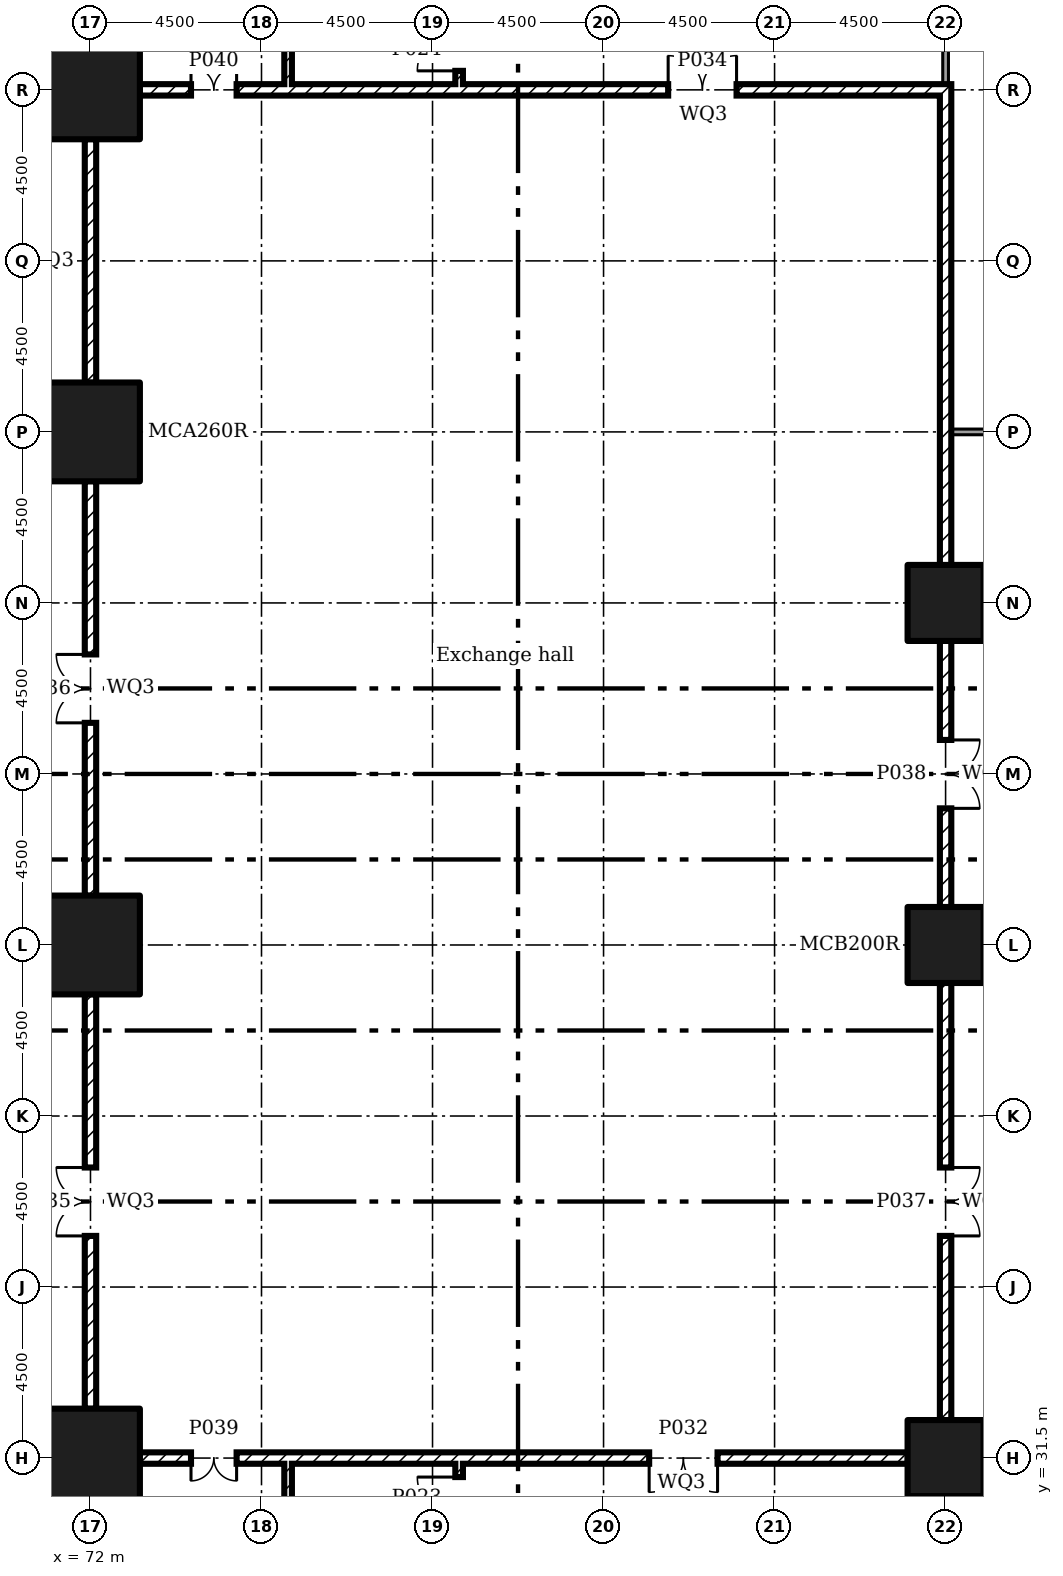
"""IFC4 building model, lengths in metres.
Left out: names, types, materials, properties, quantities, classifications, styles, units other than length and angle.
Written with IfcOpenShell. Run it as: python <this file> out.ifc"""

import sys

from ifc_helpers import new_model, si_unit, direction, frame, frame_2d, origin, origin_2d, place, context, subcontext, project, spatial, rectangle, extrude, element, fill, save


model = new_model("IFC4")
c1 = context("Model", 3, precision=1e-05, world=origin(), true_north=direction((0.0, 1.0)))
c2 = subcontext(c1, "Body", "Model", "MODEL_VIEW")
j1 = project(units=[si_unit("LENGTHUNIT", "METRE"), si_unit("PLANEANGLEUNIT", "RADIAN")], contexts=[c1])
p1 = place(None, origin())
s1 = spatial("IfcSite", under=j1, at=p1, CompositionType="ELEMENT")
p2 = place(p1, origin())
s2 = spatial("IfcBuilding", under=s1, at=p2, CompositionType="ELEMENT")
p3 = place(p2, frame((0.0, 0.0, 6.0)))
s3 = spatial("IfcBuildingStorey", under=s2, at=p3, CompositionType="ELEMENT", Elevation=6.0)
for number, where in (
    (1, (72.0, 31.5, 0.0)),
    (2, (72.0, 45.0, 0.0)),
    (3, (72.0, 58.5, 0.0)),
    (4, (72.0, 67.5, 0.0)),
):
    element("IfcColumn", number, at=place(p3, frame(where)), inside=s3, PredefinedType="COLUMN", context=c2, shape_type="SweptSolid", body=[
        extrude(rectangle(XDim=2.6, YDim=2.6, at=origin_2d()), origin(), (0.0, 0.0, 1.0), 5.5),
    ])
for number, where in (
    (5, (94.5, 31.5, 0.0)),
    (6, (94.5, 45.0, 0.0)),
    (7, (94.5, 54.0, 0.0)),
):
    element("IfcColumn", number, at=place(p3, frame(where)), inside=s3, PredefinedType="COLUMN", context=c2, shape_type="SweptSolid", body=[
        extrude(rectangle(XDim=2.0, YDim=2.0, at=origin_2d()), origin(), (0.0, 0.0, 1.0), 5.5),
    ])
p4 = place(p3, frame((81.6, 31.5, 0.0)))
e8 = element("IfcWall", 8, at=p4, inside=s3, PredefinedType="SOLIDWALL", context=c2, shape_type="SweptSolid", body=[
    extrude(rectangle(XDim=11.905, YDim=0.3, at=frame_2d((5.952, 0.0))), origin(), (0.0, 0.0, 1.0), 5.5),
])
p5 = place(p4, frame((5.1, 0.0, 0.0)))
e9 = element("IfcOpeningElement", 9, at=p5, cuts=e8, PredefinedType="OPENING", context=c2, shape_type="SweptSolid", body=[
    extrude(rectangle(XDim=1.8, YDim=2.1, at=frame_2d((0.9, 1.05))), frame((0.0, 0.16, 0.0), z_axis=(0.0, -1.0, 0.0), x_axis=(1.0, 0.0, 0.0)), (0.0, 0.0, 1.0), 0.32),
])
p6 = place(p3, frame((94.5, 26.925, 0.0), z_axis=(0.0, 0.0, 1.0), x_axis=(0.0, 1.0, 0.0)))
e10 = element("IfcWall", 10, at=p6, inside=s3, PredefinedType="PARTITIONING", context=c2, shape_type="SweptSolid", body=[
    extrude(rectangle(XDim=3.58, YDim=0.15, at=frame_2d((1.79, 0.0))), origin(), (0.0, 0.0, 1.0), 5.05),
])
p7 = place(p6, frame((1.225, 0.0, 0.0)))
e11 = element("IfcOpeningElement", 11, at=p7, cuts=e10, PredefinedType="OPENING", context=c2, shape_type="SweptSolid", body=[
    extrude(rectangle(XDim=1.2, YDim=2.1, at=frame_2d((0.6, 1.05))), frame((0.0, 0.085, 0.0), z_axis=(0.0, -1.0, 0.0), x_axis=(1.0, 0.0, 0.0)), (0.0, 0.0, 1.0), 0.17),
])
p8 = place(p3, frame((81.7, 22.425, 0.0), z_axis=(0.0, 0.0, 1.0), x_axis=(0.0, 1.0, 0.0)))
e12 = element("IfcWall", 12, at=p8, inside=s3, PredefinedType="SOLIDWALL", context=c2, shape_type="SweptSolid", body=[
    extrude(rectangle(XDim=8.925, YDim=0.2, at=frame_2d((4.462, 0.0))), origin(), (0.0, 0.0, 1.0), 5.05),
])
p9 = place(p8, frame((7.475, 0.0, 0.0)))
e13 = element("IfcOpeningElement", 13, at=p9, cuts=e12, PredefinedType="OPENING", context=c2, shape_type="SweptSolid", body=[
    extrude(rectangle(XDim=1.1, YDim=2.1, at=frame_2d((0.55, 1.05))), frame((0.0, 0.11, 0.0), z_axis=(0.0, -1.0, 0.0), x_axis=(1.0, 0.0, 0.0)), (0.0, 0.0, 1.0), 0.22),
])
p10 = place(p3, frame((81.6, 67.5, 0.0)))
e14 = element("IfcWall", 14, at=p10, inside=s3, PredefinedType="SOLIDWALL", context=c2, shape_type="SweptSolid", body=[
    extrude(rectangle(XDim=13.05, YDim=0.3, at=frame_2d((6.525, 0.0))), origin(), (0.0, 0.0, 1.0), 5.5),
])
p11 = place(p10, frame((5.6, 0.0, 0.0)))
e15 = element("IfcOpeningElement", 15, at=p11, cuts=e14, PredefinedType="OPENING", context=c2, shape_type="SweptSolid", body=[
    extrude(rectangle(XDim=1.8, YDim=2.1, at=frame_2d((0.9, 1.05))), frame((0.0, 0.16, 0.0), z_axis=(0.0, -1.0, 0.0), x_axis=(1.0, 0.0, 0.0)), (0.0, 0.0, 1.0), 0.32),
])
p12 = place(p3, frame((72.0, 32.795, 0.0), z_axis=(0.0, 0.0, 1.0), x_axis=(0.0, 1.0, 0.0)))
e16 = element("IfcWall", 16, at=p12, inside=s3, PredefinedType="SOLIDWALL", context=c2, shape_type="SweptSolid", body=[
    extrude(rectangle(XDim=10.91, YDim=0.3, at=frame_2d((5.455, 0.0))), origin(), (0.0, 0.0, 1.0), 10.05),
])
p13 = place(p12, frame((4.55, 0.0, 0.0)))
e17 = element("IfcOpeningElement", 17, at=p13, cuts=e16, PredefinedType="OPENING", context=c2, shape_type="SweptSolid", body=[
    extrude(rectangle(XDim=1.8, YDim=2.1, at=frame_2d((0.9, 1.05))), frame((0.0, 0.16, 0.0), z_axis=(0.0, -1.0, 0.0), x_axis=(1.0, 0.0, 0.0)), (0.0, 0.0, 1.0), 0.32),
])
p14 = place(p3, frame((72.0, 46.295, 0.0), z_axis=(0.0, 0.0, 1.0), x_axis=(0.0, 1.0, 0.0)))
e18 = element("IfcWall", 18, at=p14, inside=s3, PredefinedType="SOLIDWALL", context=c2, shape_type="SweptSolid", body=[
    extrude(rectangle(XDim=10.91, YDim=0.3, at=frame_2d((5.455, 0.0))), origin(), (0.0, 0.0, 1.0), 10.05),
])
p15 = place(p14, frame((4.55, 0.0, 0.0)))
e19 = element("IfcOpeningElement", 19, at=p15, cuts=e18, PredefinedType="OPENING", context=c2, shape_type="SweptSolid", body=[
    extrude(rectangle(XDim=1.8, YDim=2.1, at=frame_2d((0.9, 1.05))), frame((0.0, 0.16, 0.0), z_axis=(0.0, -1.0, 0.0), x_axis=(1.0, 0.0, 0.0)), (0.0, 0.0, 1.0), 0.32),
])
p16 = place(p3, frame((72.0, 59.795, 0.0), z_axis=(0.0, 0.0, 1.0), x_axis=(0.0, 1.0, 0.0)))
e20 = element("IfcWall", 20, at=p16, inside=s3, PredefinedType="SOLIDWALL", context=c2, shape_type="SweptSolid", body=[
    extrude(rectangle(XDim=6.41, YDim=0.3, at=frame_2d((3.205, 0.0))), origin(), (0.0, 0.0, 1.0), 10.05),
])
p17 = place(p3, frame((94.5, 32.495, 0.0), z_axis=(0.0, 0.0, 1.0), x_axis=(0.0, 1.0, 0.0)))
e21 = element("IfcWall", 21, at=p17, inside=s3, PredefinedType="SOLIDWALL", context=c2, shape_type="SweptSolid", body=[
    extrude(rectangle(XDim=11.51, YDim=0.3, at=frame_2d((5.755, 0.0))), origin(), (0.0, 0.0, 1.0), 10.05),
])
p18 = place(p17, frame((4.85, 0.0, 0.0)))
e22 = element("IfcOpeningElement", 22, at=p18, cuts=e21, PredefinedType="OPENING", context=c2, shape_type="SweptSolid", body=[
    extrude(rectangle(XDim=1.8, YDim=2.1, at=frame_2d((0.9, 1.05))), frame((0.0, 0.16, 0.0), z_axis=(0.0, -1.0, 0.0), x_axis=(1.0, 0.0, 0.0)), (0.0, 0.0, 1.0), 0.32),
])
p19 = place(p3, frame((94.5, 45.995, 0.0), z_axis=(0.0, 0.0, 1.0), x_axis=(0.0, 1.0, 0.0)))
e23 = element("IfcWall", 23, at=p19, inside=s3, PredefinedType="SOLIDWALL", context=c2, shape_type="SweptSolid", body=[
    extrude(rectangle(XDim=7.01, YDim=0.3, at=frame_2d((3.505, 0.0))), origin(), (0.0, 0.0, 1.0), 10.05),
])
p20 = place(p19, frame((2.6, 0.0, 0.0)))
e24 = element("IfcOpeningElement", 24, at=p20, cuts=e23, PredefinedType="OPENING", context=c2, shape_type="SweptSolid", body=[
    extrude(rectangle(XDim=1.8, YDim=2.1, at=frame_2d((0.9, 1.05))), frame((0.0, 0.16, 0.0), z_axis=(0.0, -1.0, 0.0), x_axis=(1.0, 0.0, 0.0)), (0.0, 0.0, 1.0), 0.32),
])
p21 = place(p3, frame((94.5, 54.995, 0.0), z_axis=(0.0, 0.0, 1.0), x_axis=(0.0, 1.0, 0.0)))
e25 = element("IfcWall", 25, at=p21, inside=s3, PredefinedType="SOLIDWALL", context=c2, shape_type="SweptSolid", body=[
    extrude(rectangle(XDim=3.58, YDim=0.3, at=frame_2d((1.79, 0.0))), origin(), (0.0, 0.0, 1.0), 10.05),
])
p22 = place(p3, frame((94.5, 58.425, 0.0), z_axis=(0.0, 0.0, 1.0), x_axis=(0.0, 1.0, 0.0)))
e26 = element("IfcWall", 26, at=p22, inside=s3, PredefinedType="SOLIDWALL", context=c2, shape_type="SweptSolid", body=[
    extrude(rectangle(XDim=8.925, YDim=0.3, at=frame_2d((4.462, 0.0))), origin(), (0.0, 0.0, 1.0), 10.05),
])
p23 = place(p3, frame((73.295, 31.5, 0.0)))
e27 = element("IfcWall", 27, at=p23, inside=s3, PredefinedType="SOLIDWALL", context=c2, shape_type="SweptSolid", body=[
    extrude(rectangle(XDim=4.005, YDim=0.3, at=frame_2d((2.002, 0.0))), origin(), (0.0, 0.0, 1.0), 5.5),
])
p24 = place(p23, frame((1.35, 0.0, 0.0)))
e28 = element("IfcOpeningElement", 28, at=p24, cuts=e27, PredefinedType="OPENING", context=c2, shape_type="SweptSolid", body=[
    extrude(rectangle(XDim=1.2, YDim=2.1, at=frame_2d((0.6, 1.05))), frame((0.0, 0.16, 0.0), z_axis=(0.0, -1.0, 0.0), x_axis=(1.0, 0.0, 0.0)), (0.0, 0.0, 1.0), 0.32),
])
p25 = place(p3, frame((77.2, 31.5, 0.0)))
e29 = element("IfcWall", 29, at=p25, inside=s3, PredefinedType="SOLIDWALL", context=c2, shape_type="SweptSolid", body=[
    extrude(rectangle(XDim=4.5, YDim=0.3, at=frame_2d((2.25, 0.0))), origin(), (0.0, 0.0, 1.0), 5.5),
])
p26 = place(p3, frame((73.295, 67.5, 0.0)))
e30 = element("IfcWall", 30, at=p26, inside=s3, PredefinedType="SOLIDWALL", context=c2, shape_type="SweptSolid", body=[
    extrude(rectangle(XDim=4.005, YDim=0.3, at=frame_2d((2.002, 0.0))), origin(), (0.0, 0.0, 1.0), 5.5),
])
p27 = place(p26, frame((1.35, 0.0, 0.0)))
e31 = element("IfcOpeningElement", 31, at=p27, cuts=e30, PredefinedType="OPENING", context=c2, shape_type="SweptSolid", body=[
    extrude(rectangle(XDim=1.2, YDim=2.1, at=frame_2d((0.6, 1.05))), frame((0.0, 0.16, 0.0), z_axis=(0.0, -1.0, 0.0), x_axis=(1.0, 0.0, 0.0)), (0.0, 0.0, 1.0), 0.32),
])
p28 = place(p3, frame((77.2, 67.5, 0.0)))
e32 = element("IfcWall", 32, at=p28, inside=s3, PredefinedType="SOLIDWALL", context=c2, shape_type="SweptSolid", body=[
    extrude(rectangle(XDim=4.5, YDim=0.3, at=frame_2d((2.25, 0.0))), origin(), (0.0, 0.0, 1.0), 5.5),
])
p29 = place(p3, frame((94.5, 67.5, 0.0), z_axis=(0.0, 0.0, 1.0), x_axis=(0.0, 1.0, 0.0)))
e33 = element("IfcWall", 33, at=p29, inside=s3, PredefinedType="PARTITIONING", context=c2, shape_type="SweptSolid", body=[
    extrude(rectangle(XDim=8.925, YDim=0.15, at=frame_2d((4.462, 0.0))), origin(), (0.0, 0.0, 1.0), 5.05),
])
p30 = place(p3, frame((81.7, 67.65, 0.0), z_axis=(0.0, 0.0, 1.0), x_axis=(0.0, 1.0, 0.0)))
e34 = element("IfcWall", 34, at=p30, inside=s3, PredefinedType="SOLIDWALL", context=c2, shape_type="SweptSolid", body=[
    extrude(rectangle(XDim=8.925, YDim=0.2, at=frame_2d((4.462, 0.0))), origin(), (0.0, 0.0, 1.0), 5.05),
])
p31 = place(p30, frame((0.35, 0.0, 0.0)))
e35 = element("IfcOpeningElement", 35, at=p31, cuts=e34, PredefinedType="OPENING", context=c2, shape_type="SweptSolid", body=[
    extrude(rectangle(XDim=1.1, YDim=2.1, at=frame_2d((0.55, 1.05))), frame((0.0, 0.11, 0.0), z_axis=(0.0, -1.0, 0.0), x_axis=(1.0, 0.0, 0.0)), (0.0, 0.0, 1.0), 0.22),
])
p32 = place(p3, frame((94.65, 58.5, 0.0)))
e36 = element("IfcWall", 36, at=p32, inside=s3, PredefinedType="PARTITIONING", context=c2, shape_type="SweptSolid", body=[
    extrude(rectangle(XDim=3.355, YDim=0.15, at=frame_2d((1.677, 0.0))), origin(), (0.0, 0.0, 1.0), 5.05),
])
for number, where, z_axis, x_axis in (
    (37, (77.2, 22.6, 0.0), (0.0, 0.0, 1.0), (0.0, 1.0, 0.0)),
    (38, (77.2, 67.65, 0.0), (0.0, 0.0, 1.0), (0.0, 1.0, 0.0)),
):
    element("IfcWall", number, at=place(p3, frame(where, z_axis=z_axis, x_axis=x_axis)), inside=s3, PredefinedType="SOLIDWALL", context=c2, shape_type="SweptSolid", body=[
        extrude(rectangle(XDim=8.75, YDim=0.2, at=frame_2d((4.375, 0.0))), origin(), (0.0, 0.0, 1.0), 5.05),
    ])
p33 = place(p9, origin())
e39 = element("IfcDoor", 39, at=p33, inside=s3, OperationType="SINGLE_SWING_LEFT", PredefinedType="DOOR", context=c2, shape_type="SweptSolid", body=[
    extrude(rectangle(XDim=1.1, YDim=2.1, at=frame_2d((0.55, 1.05))), frame((0.0, 0.025, 0.0), z_axis=(0.0, -1.0, 0.0), x_axis=(1.0, 0.0, 0.0)), (0.0, 0.0, 1.0), 0.05),
])
fill(e13, e39)
p34 = place(p31, origin())
e40 = element("IfcDoor", 40, at=p34, inside=s3, OperationType="SINGLE_SWING_RIGHT", PredefinedType="DOOR", context=c2, shape_type="SweptSolid", body=[
    extrude(rectangle(XDim=1.1, YDim=2.1, at=frame_2d((0.55, 1.05))), frame((0.0, 0.025, 0.0), z_axis=(0.0, -1.0, 0.0), x_axis=(1.0, 0.0, 0.0)), (0.0, 0.0, 1.0), 0.05),
])
fill(e35, e40)
p35 = place(p5, frame((1.8, 0.0, 0.0), x_axis=(-1.0, 0.0, 0.0)))
e41 = element("IfcDoor", 41, at=p35, inside=s3, OperationType="DOUBLE_DOOR_SINGLE_SWING", PredefinedType="DOOR", context=c2, shape_type="SweptSolid", body=[
    extrude(rectangle(XDim=1.8, YDim=2.1, at=frame_2d((0.9, 1.05))), frame((0.0, 0.025, 0.0), z_axis=(0.0, -1.0, 0.0), x_axis=(1.0, 0.0, 0.0)), (0.0, 0.0, 1.0), 0.05),
])
fill(e9, e41)
p36 = place(p11, origin())
e42 = element("IfcDoor", 42, at=p36, inside=s3, OperationType="DOUBLE_DOOR_SINGLE_SWING", PredefinedType="DOOR", context=c2, shape_type="SweptSolid", body=[
    extrude(rectangle(XDim=1.8, YDim=2.1, at=frame_2d((0.9, 1.05))), frame((0.0, 0.025, 0.0), z_axis=(0.0, -1.0, 0.0), x_axis=(1.0, 0.0, 0.0)), (0.0, 0.0, 1.0), 0.05),
])
fill(e15, e42)
p37 = place(p13, origin())
e43 = element("IfcDoor", 43, at=p37, inside=s3, OperationType="DOUBLE_DOOR_SINGLE_SWING", PredefinedType="DOOR", context=c2, shape_type="SweptSolid", body=[
    extrude(rectangle(XDim=1.8, YDim=2.1, at=frame_2d((0.9, 1.05))), frame((0.0, 0.025, 0.0), z_axis=(0.0, -1.0, 0.0), x_axis=(1.0, 0.0, 0.0)), (0.0, 0.0, 1.0), 0.05),
])
fill(e17, e43)
p38 = place(p15, origin())
e44 = element("IfcDoor", 44, at=p38, inside=s3, OperationType="DOUBLE_DOOR_SINGLE_SWING", PredefinedType="DOOR", context=c2, shape_type="SweptSolid", body=[
    extrude(rectangle(XDim=1.8, YDim=2.1, at=frame_2d((0.9, 1.05))), frame((0.0, 0.025, 0.0), z_axis=(0.0, -1.0, 0.0), x_axis=(1.0, 0.0, 0.0)), (0.0, 0.0, 1.0), 0.05),
])
fill(e19, e44)
p39 = place(p18, frame((1.8, 0.0, 0.0), x_axis=(-1.0, 0.0, 0.0)))
e45 = element("IfcDoor", 45, at=p39, inside=s3, OperationType="DOUBLE_DOOR_SINGLE_SWING", PredefinedType="DOOR", context=c2, shape_type="SweptSolid", body=[
    extrude(rectangle(XDim=1.8, YDim=2.1, at=frame_2d((0.9, 1.05))), frame((0.0, 0.025, 0.0), z_axis=(0.0, -1.0, 0.0), x_axis=(1.0, 0.0, 0.0)), (0.0, 0.0, 1.0), 0.05),
])
fill(e22, e45)
p40 = place(p20, frame((1.8, 0.0, 0.0), x_axis=(-1.0, 0.0, 0.0)))
e46 = element("IfcDoor", 46, at=p40, inside=s3, OperationType="DOUBLE_DOOR_SINGLE_SWING", PredefinedType="DOOR", context=c2, shape_type="SweptSolid", body=[
    extrude(rectangle(XDim=1.8, YDim=2.1, at=frame_2d((0.9, 1.05))), frame((0.0, 0.025, 0.0), z_axis=(0.0, -1.0, 0.0), x_axis=(1.0, 0.0, 0.0)), (0.0, 0.0, 1.0), 0.05),
])
fill(e24, e46)
p41 = place(p24, frame((1.2, 0.0, 0.0), x_axis=(-1.0, 0.0, 0.0)))
e47 = element("IfcDoor", 47, at=p41, inside=s3, OperationType="DOUBLE_DOOR_SINGLE_SWING", PredefinedType="DOOR", context=c2, shape_type="SweptSolid", body=[
    extrude(rectangle(XDim=1.2, YDim=2.1, at=frame_2d((0.6, 1.05))), frame((0.0, 0.025, 0.0), z_axis=(0.0, -1.0, 0.0), x_axis=(1.0, 0.0, 0.0)), (0.0, 0.0, 1.0), 0.05),
])
fill(e28, e47)
p42 = place(p27, origin())
e48 = element("IfcDoor", 48, at=p42, inside=s3, OperationType="DOUBLE_DOOR_SINGLE_SWING", PredefinedType="DOOR", context=c2, shape_type="SweptSolid", body=[
    extrude(rectangle(XDim=1.2, YDim=2.1, at=frame_2d((0.6, 1.05))), frame((0.0, 0.025, 0.0), z_axis=(0.0, -1.0, 0.0), x_axis=(1.0, 0.0, 0.0)), (0.0, 0.0, 1.0), 0.05),
])
fill(e31, e48)
save(model, sys.argv[1])
